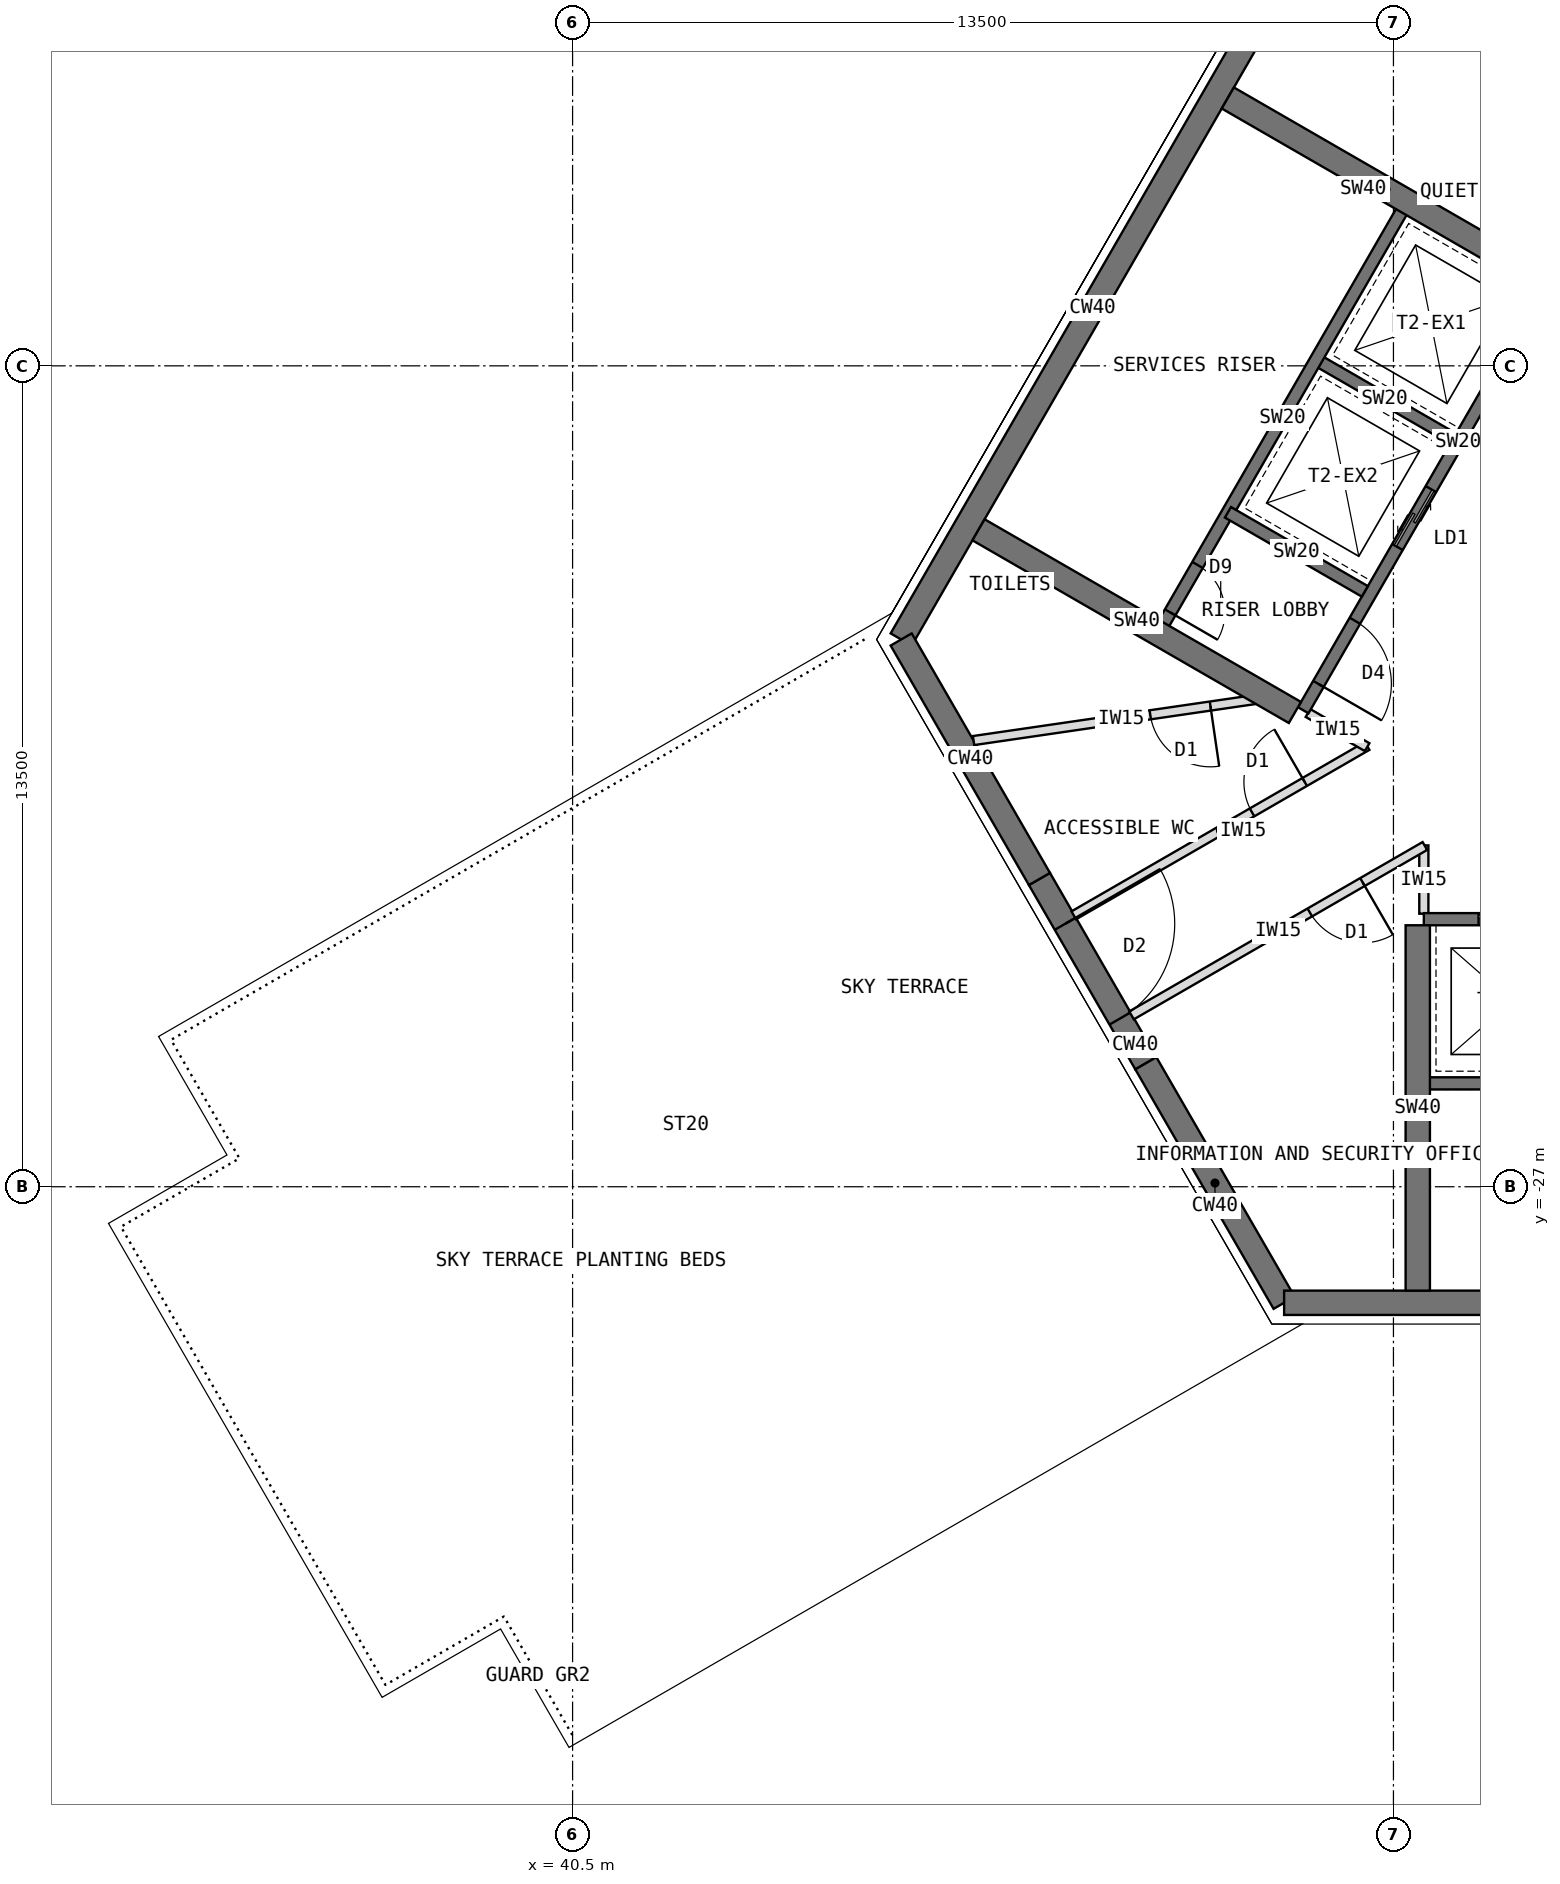
"""IFC4 building model, lengths in metres.
Left out: names, types, materials, properties, quantities, classifications, styles, units other than length and angle.
Written with IfcOpenShell. Run it as: python <this file> out.ifc"""

import sys

from ifc_helpers import new_model, si_unit, direction, frame, frame_2d, origin, place, context, subcontext, project, spatial, rectangle, extrude, element, fill, save


model = new_model("IFC4")
c1 = context("Model", 3, precision=1e-05, world=origin(), true_north=direction((0.0, 1.0)))
c2 = subcontext(c1, "Body", "Model", "MODEL_VIEW")
j1 = project(units=[si_unit("LENGTHUNIT", "METRE"), si_unit("PLANEANGLEUNIT", "RADIAN")], contexts=[c1])
p1 = place(None, origin())
s1 = spatial("IfcSite", under=j1, at=p1, CompositionType="ELEMENT")
p2 = place(p1, origin())
s2 = spatial("IfcBuilding", under=s1, at=p2, CompositionType="ELEMENT")
p3 = place(p2, frame((0.0, 0.0, 243.5)))
s3 = spatial("IfcBuildingStorey", under=s2, at=p3, CompositionType="ELEMENT", Elevation=243.5)
p4 = place(p3, frame((52.202, -7.092, 0.0), z_axis=(0.0, 0.0, 1.0), x_axis=(-0.500005998175, -0.866021940709, 0.0)))
e1 = element("IfcWall", 1, at=p4, inside=s3, PredefinedType="SHEAR", context=c2, shape_type="SweptSolid", body=[
    extrude(rectangle(XDim=12.596, YDim=0.4, at=frame_2d((6.298, 0.0))), origin(), (0.0, 0.0, 1.0), 4.0),
])
p5 = place(p3, frame((45.904, -18.0, 0.0), z_axis=(0.0, 0.0, 1.0), x_axis=(0.500024481964, -0.866011268655, 0.0)))
e2 = element("IfcWall", 2, at=p5, inside=s3, PredefinedType="SHEAR", context=c2, shape_type="SweptSolid", body=[
    extrude(rectangle(XDim=4.548, YDim=0.4, at=frame_2d((2.274, 0.0))), origin(), (0.0, 0.0, 1.0), 4.0),
])
p6 = place(p3, frame((48.178, -21.939, 0.0), z_axis=(0.0, 0.0, 1.0), x_axis=(0.500010275428, -0.866019471182, 0.0)))
e3 = element("IfcWall", 3, at=p6, inside=s3, PredefinedType="SHEAR", context=c2, shape_type="SweptSolid", body=[
    extrude(rectangle(XDim=3.5, YDim=0.4, at=frame_2d((1.75, 0.0))), origin(), (0.0, 0.0, 1.0), 4.0),
])
p7 = place(p6, frame((0.85, 0.0, 0.0)))
e4 = element("IfcOpeningElement", 4, at=p7, cuts=e3, PredefinedType="OPENING", context=c2, shape_type="SweptSolid", body=[
    extrude(rectangle(XDim=1.8, YDim=2.1, at=frame_2d((0.9, 1.05))), frame((0.0, 0.21, 0.0), z_axis=(0.0, -1.0, 0.0), x_axis=(1.0, 0.0, 0.0)), (0.0, 0.0, 1.0), 0.42),
])
p8 = place(p3, frame((49.928, -24.97, 0.0), z_axis=(0.0, 0.0, 1.0), x_axis=(0.499984222037, -0.866034513004, 0.0)))
e5 = element("IfcWall", 5, at=p8, inside=s3, PredefinedType="SHEAR", context=c2, shape_type="SweptSolid", body=[
    extrude(rectangle(XDim=4.548, YDim=0.4, at=frame_2d((2.274, 0.0))), origin(), (0.0, 0.0, 1.0), 4.0),
])
p9 = place(p3, frame((52.202, -28.908, 0.0), z_axis=(0.0, 0.0, 1.0), x_axis=(1.0, 0.0, 0.0)))
e6 = element("IfcWall", 6, at=p9, inside=s3, PredefinedType="SHEAR", context=c2, shape_type="SweptSolid", body=[
    extrude(rectangle(XDim=12.596, YDim=0.4, at=frame_2d((6.298, 0.0))), origin(), (0.0, 0.0, 1.0), 4.0),
])
p10 = place(p3, frame((56.516, -12.236, 0.0), z_axis=(0.0, 0.0, 1.0), x_axis=(-0.49999894854, -0.866026010844, 0.0)))
e7 = element("IfcWall", 7, at=p10, inside=s3, PredefinedType="SHEAR", context=c2, shape_type="SweptSolid", body=[
    extrude(rectangle(XDim=8.0, YDim=0.2, at=frame_2d((4.0, 0.0))), origin(), (0.0, 0.0, 1.0), 4.0),
])
p11 = place(p10, frame((6.3, 0.0, 0.0)))
e8 = element("IfcOpeningElement", 8, at=p11, cuts=e7, PredefinedType="OPENING", context=c2, shape_type="SweptSolid", body=[
    extrude(rectangle(XDim=1.2, YDim=2.1, at=frame_2d((0.6, 1.05))), frame((0.0, 0.11, 0.0), z_axis=(0.0, -1.0, 0.0), x_axis=(1.0, 0.0, 0.0)), (0.0, 0.0, 1.0), 0.22),
])
p12 = place(p10, frame((0.9, 0.0, 0.0)))
e9 = element("IfcOpeningElement", 9, at=p12, cuts=e7, PredefinedType="OPENING", context=c2, shape_type="SweptSolid", body=[
    extrude(rectangle(XDim=1.1, YDim=2.2, at=frame_2d((0.55, 1.1))), frame((0.0, 0.11, 0.0), z_axis=(0.0, -1.0, 0.0), x_axis=(1.0, 0.0, 0.0)), (0.0, 0.0, 1.0), 0.22),
])
p13 = place(p10, frame((3.8, 0.0, 0.0)))
e10 = element("IfcOpeningElement", 10, at=p13, cuts=e7, PredefinedType="OPENING", context=c2, shape_type="SweptSolid", body=[
    extrude(rectangle(XDim=1.1, YDim=2.2, at=frame_2d((0.55, 1.1))), frame((0.0, 0.11, 0.0), z_axis=(0.0, -1.0, 0.0), x_axis=(1.0, 0.0, 0.0)), (0.0, 0.0, 1.0), 0.22),
])
for number, where, z_axis, x_axis in (
    (11, (54.98, -14.697, 0.0), (0.0, 0.0, 1.0), (-0.866, 0.5, 0.0)),
    (12, (53.53, -17.209, 0.0), (0.0, 0.0, 1.0), (-0.866, 0.5, 0.0)),
):
    element("IfcWall", number, at=place(p3, frame(where, z_axis=z_axis, x_axis=x_axis)), inside=s3, PredefinedType="SHEAR", context=c2, shape_type="SweptSolid", body=[
        extrude(rectangle(XDim=2.6, YDim=0.2, at=frame_2d((1.3, 0.0))), origin(), (0.0, 0.0, 1.0), 4.0),
    ])
p14 = place(p3, frame((54.178, -10.886, 0.0), z_axis=(0.0, 0.0, 1.0), x_axis=(-0.49999894854, -0.866026010844, 0.0)))
e13 = element("IfcWall", 13, at=p14, inside=s3, PredefinedType="SHEAR", context=c2, shape_type="SweptSolid", body=[
    extrude(rectangle(XDim=8.0, YDim=0.2, at=frame_2d((4.0, 0.0))), origin(), (0.0, 0.0, 1.0), 4.0),
])
p15 = place(p14, frame((6.8, 0.0, 0.0)))
e14 = element("IfcOpeningElement", 14, at=p15, cuts=e13, PredefinedType="OPENING", context=c2, shape_type="SweptSolid", body=[
    extrude(rectangle(XDim=0.9, YDim=2.1, at=frame_2d((0.45, 1.05))), frame((0.0, 0.11, 0.0), z_axis=(0.0, -1.0, 0.0), x_axis=(1.0, 0.0, 0.0)), (0.0, 0.0, 1.0), 0.22),
])
for number, where, z_axis, x_axis in (
    (15, (52.38, -19.201, 0.0), (0.0, 0.0, 1.0), (-0.866, 0.5, 0.0)),
    (16, (56.48, -12.099, 0.0), (0.0, 0.0, 1.0), (-0.866, 0.5, 0.0)),
):
    element("IfcWall", number, at=place(p3, frame(where, z_axis=z_axis, x_axis=x_axis)), inside=s3, PredefinedType="SHEAR", context=c2, shape_type="SweptSolid", body=[
        extrude(rectangle(XDim=6.008, YDim=0.4, at=frame_2d((3.004, 0.0))), origin(), (0.0, 0.0, 1.0), 4.0),
    ])
p16 = place(p3, frame((54.5, -22.6, 0.0), z_axis=(0.0, 0.0, 1.0), x_axis=(1.0, 0.0, 0.0)))
e17 = element("IfcWall", 17, at=p16, inside=s3, PredefinedType="SHEAR", context=c2, shape_type="SweptSolid", body=[
    extrude(rectangle(XDim=8.0, YDim=0.2, at=frame_2d((4.0, 0.0))), origin(), (0.0, 0.0, 1.0), 4.0),
])
p17 = place(p16, frame((6.3, 0.0, 0.0)))
e18 = element("IfcOpeningElement", 18, at=p17, cuts=e17, PredefinedType="OPENING", context=c2, shape_type="SweptSolid", body=[
    extrude(rectangle(XDim=1.2, YDim=2.1, at=frame_2d((0.6, 1.05))), frame((0.0, 0.11, 0.0), z_axis=(0.0, -1.0, 0.0), x_axis=(1.0, 0.0, 0.0)), (0.0, 0.0, 1.0), 0.22),
])
p18 = place(p16, frame((0.9, 0.0, 0.0)))
e19 = element("IfcOpeningElement", 19, at=p18, cuts=e17, PredefinedType="OPENING", context=c2, shape_type="SweptSolid", body=[
    extrude(rectangle(XDim=1.1, YDim=2.2, at=frame_2d((0.55, 1.1))), frame((0.0, 0.11, 0.0), z_axis=(0.0, -1.0, 0.0), x_axis=(1.0, 0.0, 0.0)), (0.0, 0.0, 1.0), 0.22),
])
p19 = place(p3, frame((54.5, -25.3, 0.0), z_axis=(0.0, 0.0, 1.0), x_axis=(1.0, 0.0, 0.0)))
e20 = element("IfcWall", 20, at=p19, inside=s3, PredefinedType="SHEAR", context=c2, shape_type="SweptSolid", body=[
    extrude(rectangle(XDim=8.0, YDim=0.2, at=frame_2d((4.0, 0.0))), origin(), (0.0, 0.0, 1.0), 4.0),
])
p20 = place(p19, frame((6.7, 0.0, 0.0)))
e21 = element("IfcOpeningElement", 21, at=p20, cuts=e20, PredefinedType="OPENING", context=c2, shape_type="SweptSolid", body=[
    extrude(rectangle(XDim=1.1, YDim=2.1, at=frame_2d((0.55, 1.05))), frame((0.0, 0.11, 0.0), z_axis=(0.0, -1.0, 0.0), x_axis=(1.0, 0.0, 0.0)), (0.0, 0.0, 1.0), 0.22),
])
p21 = place(p3, frame((54.4, -22.7, 0.0), z_axis=(0.0, 0.0, 1.0), x_axis=(0.0, -1.0, 0.0)))
e22 = element("IfcWall", 22, at=p21, inside=s3, PredefinedType="SHEAR", context=c2, shape_type="SweptSolid", body=[
    extrude(rectangle(XDim=6.008, YDim=0.4, at=frame_2d((3.004, 0.0))), origin(), (0.0, 0.0, 1.0), 4.0),
])
p22 = place(p3, frame((54.5, -22.51, 0.0), z_axis=(0.0, 0.0, 1.0), x_axis=(0.0, 1.0, 0.0)))
e23 = element("IfcWall", 23, at=p22, inside=s3, PredefinedType="PARTITIONING", context=c2, shape_type="SweptSolid", body=[
    extrude(rectangle(XDim=1.124, YDim=0.15, at=frame_2d((0.562, 0.0))), origin(), (0.0, 0.0, 1.0), 3.8),
])
p23 = place(p3, frame((54.517, -21.396, 0.0), z_axis=(0.0, 0.0, 1.0), x_axis=(-0.866036713669, -0.499980410194, 0.0)))
e24 = element("IfcWall", 24, at=p23, inside=s3, PredefinedType="PARTITIONING", context=c2, shape_type="SweptSolid", body=[
    extrude(rectangle(XDim=5.571, YDim=0.15, at=frame_2d((2.786, 0.0))), origin(), (0.0, 0.0, 1.0), 3.8),
])
p24 = place(p23, frame((1.186, 0.0, 0.0)))
e25 = element("IfcOpeningElement", 25, at=p24, cuts=e24, PredefinedType="OPENING", context=c2, shape_type="SweptSolid", body=[
    extrude(rectangle(XDim=1.0, YDim=2.1, at=frame_2d((0.5, 1.05))), frame((0.0, 0.085, 0.0), z_axis=(0.0, -1.0, 0.0), x_axis=(1.0, 0.0, 0.0)), (0.0, 0.0, 1.0), 0.17),
])
p25 = place(p3, frame((48.743, -22.536, 0.0), z_axis=(0.0, 0.0, 1.0), x_axis=(0.866036713669, 0.499980410194, 0.0)))
e26 = element("IfcWall", 26, at=p25, inside=s3, PredefinedType="PARTITIONING", context=c2, shape_type="SweptSolid", body=[
    extrude(rectangle(XDim=5.571, YDim=0.15, at=frame_2d((2.786, 0.0))), origin(), (0.0, 0.0, 1.0), 3.8),
])
p26 = place(p25, frame((3.385, 0.0, 0.0)))
e27 = element("IfcOpeningElement", 27, at=p26, cuts=e26, PredefinedType="OPENING", context=c2, shape_type="SweptSolid", body=[
    extrude(rectangle(XDim=1.0, YDim=2.1, at=frame_2d((0.5, 1.05))), frame((0.0, 0.085, 0.0), z_axis=(0.0, -1.0, 0.0), x_axis=(1.0, 0.0, 0.0)), (0.0, 0.0, 1.0), 0.17),
])
p27 = place(p3, frame((53.567, -19.771, 0.0), z_axis=(0.0, 0.0, 1.0), x_axis=(-0.865961255618, 0.500111091428, 0.0)))
e28 = element("IfcWall", 28, at=p27, inside=s3, PredefinedType="PARTITIONING", context=c2, shape_type="SweptSolid", body=[
    extrude(rectangle(XDim=1.124, YDim=0.15, at=frame_2d((0.562, 0.0))), origin(), (0.0, 0.0, 1.0), 3.8),
])
p28 = place(p3, frame((51.953, -18.954, 0.0), z_axis=(0.0, 0.0, 1.0), x_axis=(-0.989539637194, -0.144261243656, 0.0)))
e29 = element("IfcWall", 29, at=p28, inside=s3, PredefinedType="PARTITIONING", context=c2, shape_type="SweptSolid", body=[
    extrude(rectangle(XDim=4.909, YDim=0.15, at=frame_2d((2.455, 0.0))), origin(), (0.0, 0.0, 1.0), 3.8),
])
p29 = place(p28, frame((0.973, 0.0, 0.0)))
e30 = element("IfcOpeningElement", 30, at=p29, cuts=e29, PredefinedType="OPENING", context=c2, shape_type="SweptSolid", body=[
    extrude(rectangle(XDim=1.0, YDim=2.1, at=frame_2d((0.5, 1.05))), frame((0.0, 0.085, 0.0), z_axis=(0.0, -1.0, 0.0), x_axis=(1.0, 0.0, 0.0)), (0.0, 0.0, 1.0), 0.17),
])
p30 = place(p11, origin())
e31 = element("IfcDoor", 31, at=p30, inside=s3, OperationType="SINGLE_SWING_RIGHT", PredefinedType="DOOR", context=c2, shape_type="SweptSolid", body=[
    extrude(rectangle(XDim=1.2, YDim=2.1, at=frame_2d((0.6, 1.05))), frame((0.0, 0.025, 0.0), z_axis=(0.0, -1.0, 0.0), x_axis=(1.0, 0.0, 0.0)), (0.0, 0.0, 1.0), 0.05),
])
fill(e8, e31)
p31 = place(p13, origin())
e32 = element("IfcDoor", 32, at=p31, inside=s3, OperationType="DOUBLE_DOOR_SLIDING", PredefinedType="DOOR", context=c2, shape_type="SweptSolid", body=[
    extrude(rectangle(XDim=1.1, YDim=2.2, at=frame_2d((0.55, 1.1))), frame((0.0, 0.025, 0.0), z_axis=(0.0, -1.0, 0.0), x_axis=(1.0, 0.0, 0.0)), (0.0, 0.0, 1.0), 0.05),
])
fill(e10, e32)
p32 = place(p15, origin())
e33 = element("IfcDoor", 33, at=p32, inside=s3, OperationType="SINGLE_SWING_RIGHT", PredefinedType="DOOR", context=c2, shape_type="SweptSolid", body=[
    extrude(rectangle(XDim=0.9, YDim=2.1, at=frame_2d((0.45, 1.05))), frame((0.0, 0.025, 0.0), z_axis=(0.0, -1.0, 0.0), x_axis=(1.0, 0.0, 0.0)), (0.0, 0.0, 1.0), 0.05),
])
fill(e14, e33)
p33 = place(p18, origin())
e34 = element("IfcDoor", 34, at=p33, inside=s3, OperationType="DOUBLE_DOOR_SLIDING", PredefinedType="DOOR", context=c2, shape_type="SweptSolid", body=[
    extrude(rectangle(XDim=1.1, YDim=2.2, at=frame_2d((0.55, 1.1))), frame((0.0, 0.025, 0.0), z_axis=(0.0, -1.0, 0.0), x_axis=(1.0, 0.0, 0.0)), (0.0, 0.0, 1.0), 0.05),
])
fill(e19, e34)
p34 = place(p7, origin())
e35 = element("IfcDoor", 35, at=p34, inside=s3, OperationType="DOUBLE_DOOR_DOUBLE_SWING", PredefinedType="DOOR", context=c2, shape_type="SweptSolid", body=[
    extrude(rectangle(XDim=1.8, YDim=2.1, at=frame_2d((0.9, 1.05))), frame((0.0, 0.025, 0.0), z_axis=(0.0, -1.0, 0.0), x_axis=(1.0, 0.0, 0.0)), (0.0, 0.0, 1.0), 0.05),
])
fill(e4, e35)
p35 = place(p29, origin())
e36 = element("IfcDoor", 36, at=p35, inside=s3, OperationType="SINGLE_SWING_LEFT", PredefinedType="DOOR", context=c2, shape_type="SweptSolid", body=[
    extrude(rectangle(XDim=1.0, YDim=2.1, at=frame_2d((0.5, 1.05))), frame((0.0, 0.025, 0.0), z_axis=(0.0, -1.0, 0.0), x_axis=(1.0, 0.0, 0.0)), (0.0, 0.0, 1.0), 0.05),
])
fill(e30, e36)
p36 = place(p26, origin())
e37 = element("IfcDoor", 37, at=p36, inside=s3, OperationType="SINGLE_SWING_RIGHT", PredefinedType="DOOR", context=c2, shape_type="SweptSolid", body=[
    extrude(rectangle(XDim=1.0, YDim=2.1, at=frame_2d((0.5, 1.05))), frame((0.0, 0.025, 0.0), z_axis=(0.0, -1.0, 0.0), x_axis=(1.0, 0.0, 0.0)), (0.0, 0.0, 1.0), 0.05),
])
fill(e27, e37)
p37 = place(p24, origin())
e38 = element("IfcDoor", 38, at=p37, inside=s3, OperationType="SINGLE_SWING_LEFT", PredefinedType="DOOR", context=c2, shape_type="SweptSolid", body=[
    extrude(rectangle(XDim=1.0, YDim=2.1, at=frame_2d((0.5, 1.05))), frame((0.0, 0.025, 0.0), z_axis=(0.0, -1.0, 0.0), x_axis=(1.0, 0.0, 0.0)), (0.0, 0.0, 1.0), 0.05),
])
fill(e25, e38)
save(model, sys.argv[1])
